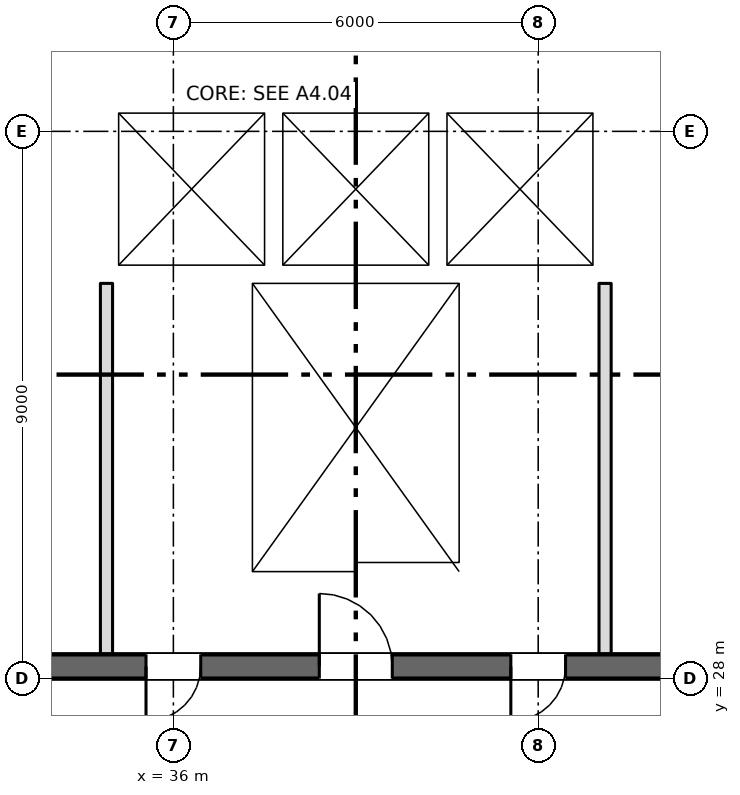
"""IFC4 building model, lengths in metres.
Left out: names, types, materials, properties, quantities, classifications, styles, units other than length and angle.
Written with IfcOpenShell. Run it as: python <this file> out.ifc"""

import sys

from ifc_helpers import new_model, si_unit, direction, frame, frame_2d, origin, place, context, subcontext, project, spatial, rectangle, extrude, element, fill, save


model = new_model("IFC4")
c1 = context("Model", 3, precision=1e-05, world=origin(), true_north=direction((0.0, 1.0)))
c2 = subcontext(c1, "Body", "Model", "MODEL_VIEW")
j1 = project(units=[si_unit("LENGTHUNIT", "METRE"), si_unit("PLANEANGLEUNIT", "RADIAN")], contexts=[c1])
p1 = place(None, origin())
s1 = spatial("IfcSite", under=j1, at=p1, CompositionType="ELEMENT")
p2 = place(p1, origin())
s2 = spatial("IfcBuilding", under=s1, at=p2, CompositionType="ELEMENT")
p3 = place(p2, frame((0.0, 0.0, 6.5)))
s3 = spatial("IfcBuildingStorey", under=s2, at=p3, CompositionType="ELEMENT", Elevation=6.5)
p4 = place(p3, frame((6.7, 28.2, 0.0), z_axis=(0.0, 0.0, 1.0), x_axis=(1.0, 0.0, 0.0)))
e1 = element("IfcWall", 1, at=p4, inside=s3, PredefinedType="SHEAR", context=c2, shape_type="SweptSolid", body=[
    extrude(rectangle(XDim=66.3, YDim=0.4, at=frame_2d((33.15, 0.0))), origin(), (0.0, 0.0, 1.0), 4.3),
])
p5 = place(p4, frame((13.85, 0.0, 0.0)))
e2 = element("IfcOpeningElement", 2, at=p5, cuts=e1, PredefinedType="OPENING", context=c2, shape_type="SweptSolid", body=[
    extrude(rectangle(XDim=0.9, YDim=2.1, at=frame_2d((0.45, 1.05))), frame((0.0, 0.21, 0.0), z_axis=(0.0, -1.0, 0.0), x_axis=(1.0, 0.0, 0.0)), (0.0, 0.0, 1.0), 0.42),
])
p6 = place(p4, frame((48.562, 0.0, 0.0)))
e3 = element("IfcOpeningElement", 3, at=p6, cuts=e1, PredefinedType="OPENING", context=c2, shape_type="SweptSolid", body=[
    extrude(rectangle(XDim=0.9, YDim=2.1, at=frame_2d((0.45, 1.05))), frame((0.0, 0.21, 0.0), z_axis=(0.0, -1.0, 0.0), x_axis=(1.0, 0.0, 0.0)), (0.0, 0.0, 1.0), 0.42),
])
p7 = place(p4, frame((51.137, 0.0, 0.0)))
e4 = element("IfcOpeningElement", 4, at=p7, cuts=e1, PredefinedType="OPENING", context=c2, shape_type="SweptSolid", body=[
    extrude(rectangle(XDim=0.9, YDim=2.1, at=frame_2d((0.45, 1.05))), frame((0.0, 0.21, 0.0), z_axis=(0.0, -1.0, 0.0), x_axis=(1.0, 0.0, 0.0)), (0.0, 0.0, 1.0), 0.42),
])
p8 = place(p4, frame((1.35, 0.0, 0.0)))
e5 = element("IfcOpeningElement", 5, at=p8, cuts=e1, PredefinedType="OPENING", context=c2, shape_type="SweptSolid", body=[
    extrude(rectangle(XDim=0.9, YDim=2.1, at=frame_2d((0.45, 1.05))), frame((0.0, 0.21, 0.0), z_axis=(0.0, -1.0, 0.0), x_axis=(1.0, 0.0, 0.0)), (0.0, 0.0, 1.0), 0.42),
])
p9 = place(p4, frame((59.363, 0.0, 0.0)))
e6 = element("IfcOpeningElement", 6, at=p9, cuts=e1, PredefinedType="OPENING", context=c2, shape_type="SweptSolid", body=[
    extrude(rectangle(XDim=0.9, YDim=2.1, at=frame_2d((0.45, 1.05))), frame((0.0, 0.21, 0.0), z_axis=(0.0, -1.0, 0.0), x_axis=(1.0, 0.0, 0.0)), (0.0, 0.0, 1.0), 0.42),
])
p10 = place(p4, frame((63.538, 0.0, 0.0)))
e7 = element("IfcOpeningElement", 7, at=p10, cuts=e1, PredefinedType="OPENING", context=c2, shape_type="SweptSolid", body=[
    extrude(rectangle(XDim=0.9, YDim=2.1, at=frame_2d((0.45, 1.05))), frame((0.0, 0.21, 0.0), z_axis=(0.0, -1.0, 0.0), x_axis=(1.0, 0.0, 0.0)), (0.0, 0.0, 1.0), 0.42),
])
p11 = place(p4, frame((4.7, 0.0, 0.0)))
e8 = element("IfcOpeningElement", 8, at=p11, cuts=e1, PredefinedType="OPENING", context=c2, shape_type="SweptSolid", body=[
    extrude(rectangle(XDim=1.2, YDim=2.1, at=frame_2d((0.6, 1.05))), frame((0.0, 0.21, 0.0), z_axis=(0.0, -1.0, 0.0), x_axis=(1.0, 0.0, 0.0)), (0.0, 0.0, 1.0), 0.42),
])
p12 = place(p4, frame((31.7, 0.0, 0.0)))
e9 = element("IfcOpeningElement", 9, at=p12, cuts=e1, PredefinedType="OPENING", context=c2, shape_type="SweptSolid", body=[
    extrude(rectangle(XDim=1.2, YDim=2.1, at=frame_2d((0.6, 1.05))), frame((0.0, 0.21, 0.0), z_axis=(0.0, -1.0, 0.0), x_axis=(1.0, 0.0, 0.0)), (0.0, 0.0, 1.0), 0.42),
])
p13 = place(p4, frame((55.2, 0.0, 0.0)))
e10 = element("IfcOpeningElement", 10, at=p13, cuts=e1, PredefinedType="OPENING", context=c2, shape_type="SweptSolid", body=[
    extrude(rectangle(XDim=1.2, YDim=2.1, at=frame_2d((0.6, 1.05))), frame((0.0, 0.21, 0.0), z_axis=(0.0, -1.0, 0.0), x_axis=(1.0, 0.0, 0.0)), (0.0, 0.0, 1.0), 0.42),
])
p14 = place(p4, frame((21.7, 0.0, 0.0)))
e11 = element("IfcOpeningElement", 11, at=p14, cuts=e1, PredefinedType="OPENING", context=c2, shape_type="SweptSolid", body=[
    extrude(rectangle(XDim=1.2, YDim=2.1, at=frame_2d((0.6, 1.05))), frame((0.0, 0.21, 0.0), z_axis=(0.0, -1.0, 0.0), x_axis=(1.0, 0.0, 0.0)), (0.0, 0.0, 1.0), 0.42),
])
p15 = place(p4, frame((41.7, 0.0, 0.0)))
e12 = element("IfcOpeningElement", 12, at=p15, cuts=e1, PredefinedType="OPENING", context=c2, shape_type="SweptSolid", body=[
    extrude(rectangle(XDim=1.2, YDim=2.1, at=frame_2d((0.6, 1.05))), frame((0.0, 0.21, 0.0), z_axis=(0.0, -1.0, 0.0), x_axis=(1.0, 0.0, 0.0)), (0.0, 0.0, 1.0), 0.42),
])
p16 = place(p4, frame((24.85, 0.0, 0.0)))
e13 = element("IfcOpeningElement", 13, at=p16, cuts=e1, PredefinedType="OPENING", context=c2, shape_type="SweptSolid", body=[
    extrude(rectangle(XDim=2.4, YDim=2.1, at=frame_2d((1.2, 1.05))), frame((0.0, 0.21, 0.0), z_axis=(0.0, -1.0, 0.0), x_axis=(1.0, 0.0, 0.0)), (0.0, 0.0, 1.0), 0.42),
])
p17 = place(p4, frame((37.35, 0.0, 0.0)))
e14 = element("IfcOpeningElement", 14, at=p17, cuts=e1, PredefinedType="OPENING", context=c2, shape_type="SweptSolid", body=[
    extrude(rectangle(XDim=2.4, YDim=2.1, at=frame_2d((1.2, 1.05))), frame((0.0, 0.21, 0.0), z_axis=(0.0, -1.0, 0.0), x_axis=(1.0, 0.0, 0.0)), (0.0, 0.0, 1.0), 0.42),
])
p18 = place(p4, frame((7.8, 0.0, 0.0)))
e15 = element("IfcOpeningElement", 15, at=p18, cuts=e1, PredefinedType="OPENING", context=c2, shape_type="SweptSolid", body=[
    extrude(rectangle(XDim=2.4, YDim=2.1, at=frame_2d((1.2, 1.05))), frame((0.0, 0.21, 0.0), z_axis=(0.0, -1.0, 0.0), x_axis=(1.0, 0.0, 0.0)), (0.0, 0.0, 1.0), 0.42),
])
p19 = place(p4, frame((28.85, 0.0, 0.0)))
e16 = element("IfcOpeningElement", 16, at=p19, cuts=e1, PredefinedType="OPENING", context=c2, shape_type="SweptSolid", body=[
    extrude(rectangle(XDim=0.9, YDim=2.1, at=frame_2d((0.45, 1.05))), frame((0.0, 0.21, 0.0), z_axis=(0.0, -1.0, 0.0), x_axis=(1.0, 0.0, 0.0)), (0.0, 0.0, 1.0), 0.42),
])
p20 = place(p4, frame((34.85, 0.0, 0.0)))
e17 = element("IfcOpeningElement", 17, at=p20, cuts=e1, PredefinedType="OPENING", context=c2, shape_type="SweptSolid", body=[
    extrude(rectangle(XDim=0.9, YDim=2.1, at=frame_2d((0.45, 1.05))), frame((0.0, 0.21, 0.0), z_axis=(0.0, -1.0, 0.0), x_axis=(1.0, 0.0, 0.0)), (0.0, 0.0, 1.0), 0.42),
])
for number, where, z_axis, x_axis in (
    (18, (37.15, 28.4, 0.0), (0.0, 0.0, 1.0), (0.0, 1.0, 0.0)),
    (19, (40.85, 28.4, 0.0), (0.0, 0.0, 1.0), (0.0, 1.0, 0.0)),
):
    element("IfcWall", number, at=place(p3, frame(where, z_axis=z_axis, x_axis=x_axis)), inside=s3, PredefinedType="SHEAR", context=c2, shape_type="SweptSolid", body=[
        extrude(rectangle(XDim=6.1, YDim=0.3, at=frame_2d((3.05, 0.0))), origin(), (0.0, 0.0, 1.0), 4.3),
    ])
p21 = place(p3, frame((34.8, 34.65, 0.0), z_axis=(0.0, 0.0, 1.0), x_axis=(1.0, 0.0, 0.0)))
e20 = element("IfcWall", 20, at=p21, inside=s3, PredefinedType="SHEAR", context=c2, shape_type="SweptSolid", body=[
    extrude(rectangle(XDim=8.4, YDim=0.3, at=frame_2d((4.2, 0.0))), origin(), (0.0, 0.0, 1.0), 4.3),
])
p22 = place(p3, frame((34.8, 37.45, 0.0), z_axis=(0.0, 0.0, 1.0), x_axis=(1.0, 0.0, 0.0)))
e21 = element("IfcWall", 21, at=p22, inside=s3, PredefinedType="SHEAR", context=c2, shape_type="SweptSolid", body=[
    extrude(rectangle(XDim=8.4, YDim=0.3, at=frame_2d((4.2, 0.0))), origin(), (0.0, 0.0, 1.0), 4.3),
])
p23 = place(p22, frame((0.95, 0.0, 0.0)))
e22 = element("IfcOpeningElement", 22, at=p23, cuts=e21, PredefinedType="OPENING", context=c2, shape_type="SweptSolid", body=[
    extrude(rectangle(XDim=1.1, YDim=2.1, at=frame_2d((0.55, 1.05))), frame((0.0, 0.16, 0.0), z_axis=(0.0, -1.0, 0.0), x_axis=(1.0, 0.0, 0.0)), (0.0, 0.0, 1.0), 0.32),
])
p24 = place(p22, frame((3.65, 0.0, 0.0)))
e23 = element("IfcOpeningElement", 23, at=p24, cuts=e21, PredefinedType="OPENING", context=c2, shape_type="SweptSolid", body=[
    extrude(rectangle(XDim=1.1, YDim=2.1, at=frame_2d((0.55, 1.05))), frame((0.0, 0.16, 0.0), z_axis=(0.0, -1.0, 0.0), x_axis=(1.0, 0.0, 0.0)), (0.0, 0.0, 1.0), 0.32),
])
p25 = place(p22, frame((6.35, 0.0, 0.0)))
e24 = element("IfcOpeningElement", 24, at=p25, cuts=e21, PredefinedType="OPENING", context=c2, shape_type="SweptSolid", body=[
    extrude(rectangle(XDim=1.1, YDim=2.1, at=frame_2d((0.55, 1.05))), frame((0.0, 0.16, 0.0), z_axis=(0.0, -1.0, 0.0), x_axis=(1.0, 0.0, 0.0)), (0.0, 0.0, 1.0), 0.32),
])
for number, where, z_axis, x_axis in (
    (25, (34.95, 34.8, 0.0), (0.0, 0.0, 1.0), (0.0, 1.0, 0.0)),
    (26, (43.05, 34.8, 0.0), (0.0, 0.0, 1.0), (0.0, 1.0, 0.0)),
    (27, (37.65, 34.8, 0.0), (0.0, 0.0, 1.0), (0.0, 1.0, 0.0)),
    (28, (40.35, 34.8, 0.0), (0.0, 0.0, 1.0), (0.0, 1.0, 0.0)),
):
    element("IfcWall", number, at=place(p3, frame(where, z_axis=z_axis, x_axis=x_axis)), inside=s3, PredefinedType="SHEAR", context=c2, shape_type="SweptSolid", body=[
        extrude(rectangle(XDim=2.5, YDim=0.3, at=frame_2d((1.25, 0.0))), origin(), (0.0, 0.0, 1.0), 4.3),
    ])
for number, where, z_axis, x_axis in (
    (29, (34.9, 28.4, 0.0), (0.0, 0.0, 1.0), (0.0, 1.0, 0.0)),
    (30, (43.1, 28.4, 0.0), (0.0, 0.0, 1.0), (0.0, 1.0, 0.0)),
):
    element("IfcWall", number, at=place(p3, frame(where, z_axis=z_axis, x_axis=x_axis)), inside=s3, PredefinedType="PARTITIONING", context=c2, shape_type="SweptSolid", body=[
        extrude(rectangle(XDim=6.1, YDim=0.2, at=frame_2d((3.05, 0.0))), origin(), (0.0, 0.0, 1.0), 4.3),
    ])
p26 = place(p23, origin())
e31 = element("IfcDoor", 31, at=p26, inside=s3, OperationType="SLIDING_TO_LEFT", PredefinedType="DOOR", context=c2, shape_type="SweptSolid", body=[
    extrude(rectangle(XDim=1.1, YDim=2.1, at=frame_2d((0.55, 1.05))), frame((0.0, 0.025, 0.0), z_axis=(0.0, -1.0, 0.0), x_axis=(1.0, 0.0, 0.0)), (0.0, 0.0, 1.0), 0.05),
])
fill(e22, e31)
p27 = place(p24, origin())
e32 = element("IfcDoor", 32, at=p27, inside=s3, OperationType="SLIDING_TO_LEFT", PredefinedType="DOOR", context=c2, shape_type="SweptSolid", body=[
    extrude(rectangle(XDim=1.1, YDim=2.1, at=frame_2d((0.55, 1.05))), frame((0.0, 0.025, 0.0), z_axis=(0.0, -1.0, 0.0), x_axis=(1.0, 0.0, 0.0)), (0.0, 0.0, 1.0), 0.05),
])
fill(e23, e32)
p28 = place(p25, origin())
e33 = element("IfcDoor", 33, at=p28, inside=s3, OperationType="SLIDING_TO_LEFT", PredefinedType="DOOR", context=c2, shape_type="SweptSolid", body=[
    extrude(rectangle(XDim=1.1, YDim=2.1, at=frame_2d((0.55, 1.05))), frame((0.0, 0.025, 0.0), z_axis=(0.0, -1.0, 0.0), x_axis=(1.0, 0.0, 0.0)), (0.0, 0.0, 1.0), 0.05),
])
fill(e24, e33)
p29 = place(p12, origin())
e34 = element("IfcDoor", 34, at=p29, inside=s3, OperationType="SINGLE_SWING_LEFT", PredefinedType="DOOR", context=c2, shape_type="SweptSolid", body=[
    extrude(rectangle(XDim=1.2, YDim=2.1, at=frame_2d((0.6, 1.05))), frame((0.0, 0.025, 0.0), z_axis=(0.0, -1.0, 0.0), x_axis=(1.0, 0.0, 0.0)), (0.0, 0.0, 1.0), 0.05),
])
fill(e9, e34)
p30 = place(p19, origin())
e35 = element("IfcDoor", 35, at=p30, inside=s3, OperationType="SINGLE_SWING_LEFT", PredefinedType="DOOR", context=c2, shape_type="SweptSolid", body=[
    extrude(rectangle(XDim=0.9, YDim=2.1, at=frame_2d((0.45, 1.05))), frame((0.0, 0.025, 0.0), z_axis=(0.0, -1.0, 0.0), x_axis=(1.0, 0.0, 0.0)), (0.0, 0.0, 1.0), 0.05),
])
fill(e16, e35)
p31 = place(p20, origin())
e36 = element("IfcDoor", 36, at=p31, inside=s3, OperationType="SINGLE_SWING_LEFT", PredefinedType="DOOR", context=c2, shape_type="SweptSolid", body=[
    extrude(rectangle(XDim=0.9, YDim=2.1, at=frame_2d((0.45, 1.05))), frame((0.0, 0.025, 0.0), z_axis=(0.0, -1.0, 0.0), x_axis=(1.0, 0.0, 0.0)), (0.0, 0.0, 1.0), 0.05),
])
fill(e17, e36)
save(model, sys.argv[1])
